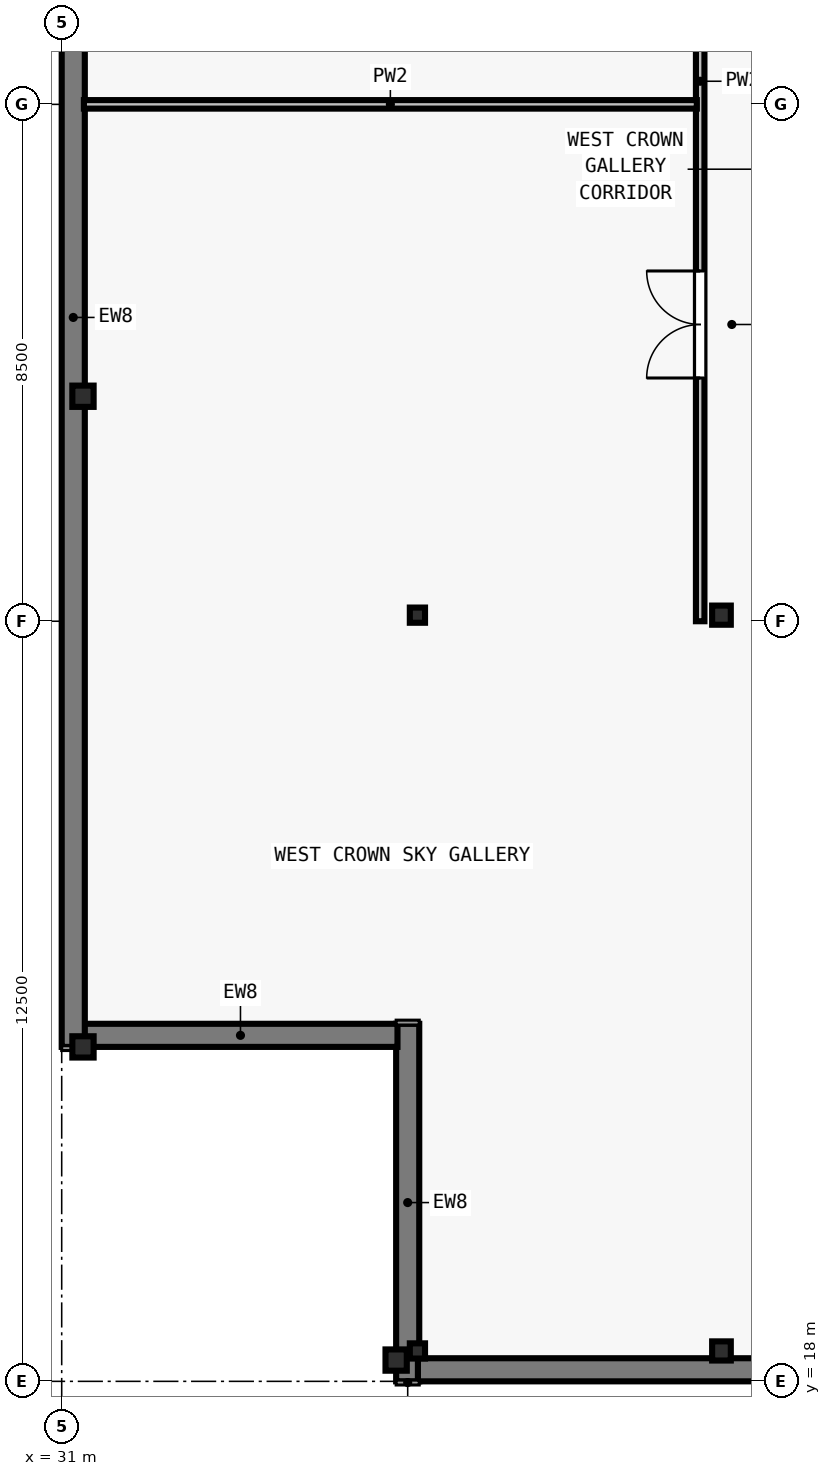
"""IFC4 building model, lengths in metres.
Left out: names, types, materials, properties, quantities, classifications, styles, units other than length and angle.
Written with IfcOpenShell. Run it as: python <this file> out.ifc"""

import sys

from ifc_helpers import new_model, si_unit, direction, frame, frame_2d, origin, origin_2d, place, context, subcontext, project, spatial, rectangle, i_section, extrude, element, fill, save


model = new_model("IFC4")
c1 = context("Model", 3, precision=1e-05, world=origin(), true_north=direction((0.0, 1.0)))
c2 = subcontext(c1, "Body", "Model", "MODEL_VIEW")
j1 = project(units=[si_unit("LENGTHUNIT", "METRE"), si_unit("PLANEANGLEUNIT", "RADIAN")], contexts=[c1])
p1 = place(None, origin())
s1 = spatial("IfcSite", under=j1, at=p1, CompositionType="ELEMENT")
p2 = place(p1, origin())
s2 = spatial("IfcBuilding", under=s1, at=p2, CompositionType="ELEMENT")
p3 = place(p2, frame((0.0, 0.0, 324.5)))
s3 = spatial("IfcBuildingStorey", under=s2, at=p3, CompositionType="ELEMENT", Elevation=324.5)
for number, where, z_axis, x_axis in (
    (1, (36.5, 18.35, 0.0), (0.0, 0.0, 1.0), (1.0, 0.0, 0.0)),
    (2, (31.35, 34.2, 0.0), (0.0, 0.0, 1.0), (1.0, 0.0, 0.0)),
    (3, (31.35, 23.5, 0.0), (0.0, 0.0, 1.0), (1.0, 0.0, 0.0)),
):
    element("IfcColumn", number, at=place(p3, frame(where, z_axis=z_axis, x_axis=x_axis)), inside=s3, PredefinedType="COLUMN", context=c2, shape_type="SweptSolid", body=[
        extrude(i_section(OverallWidth=0.35, OverallDepth=0.35, WebThickness=0.02, FlangeThickness=0.028, at=origin_2d()), origin(), (0.0, 0.0, 1.0), 5.5),
    ])
p4 = place(p3, frame((41.85, 18.5, 0.0), z_axis=(0.0, 0.0, 1.0), x_axis=(1.0, 0.0, 0.0)))
e4 = element("IfcColumn", 4, at=p4, inside=s3, PredefinedType="COLUMN", context=c2, shape_type="SweptSolid", body=[
    extrude(i_section(OverallWidth=0.307, OverallDepth=0.315, WebThickness=0.012, FlangeThickness=0.019, FilletRadius=0.016, at=origin_2d()), origin(), (0.0, 0.0, 1.0), 5.5),
])
p5 = place(p3, frame((36.85, 18.5, 0.0), z_axis=(0.0, 0.0, 1.0), x_axis=(1.0, 0.0, 0.0)))
e5 = element("IfcColumn", 5, at=p5, inside=s3, PredefinedType="PILASTER", context=c2, shape_type="SweptSolid", body=[
    extrude(i_section(OverallWidth=0.203, OverallDepth=0.203, WebThickness=0.009, FlangeThickness=0.014, FilletRadius=0.01, at=origin_2d()), origin(), (0.0, 0.0, 1.0), 5.5),
])
p6 = place(p3, frame((41.85, 30.6, 0.0), z_axis=(0.0, 0.0, 1.0), x_axis=(1.0, 0.0, 0.0)))
e6 = element("IfcColumn", 6, at=p6, inside=s3, PredefinedType="COLUMN", context=c2, shape_type="SweptSolid", body=[
    extrude(i_section(OverallWidth=0.307, OverallDepth=0.315, WebThickness=0.012, FlangeThickness=0.019, FilletRadius=0.016, at=origin_2d()), origin(), (0.0, 0.0, 1.0), 5.5),
])
p7 = place(p3, frame((36.85, 30.6, 0.0), z_axis=(0.0, 0.0, 1.0), x_axis=(1.0, 0.0, 0.0)))
e7 = element("IfcColumn", 7, at=p7, inside=s3, PredefinedType="PILASTER", context=c2, shape_type="SweptSolid", body=[
    extrude(i_section(OverallWidth=0.203, OverallDepth=0.203, WebThickness=0.009, FlangeThickness=0.014, FilletRadius=0.01, at=origin_2d()), origin(), (0.0, 0.0, 1.0), 5.5),
])
p8 = place(p3, frame((36.69, 18.0, 0.0), z_axis=(0.0, 0.0, 1.0), x_axis=(0.0, 1.0, 0.0)))
e8 = element("IfcWall", 8, at=p8, inside=s3, PredefinedType="SOLIDWALL", context=c2, shape_type="SweptSolid", body=[
    extrude(rectangle(XDim=5.88, YDim=0.38, at=frame_2d((2.94, 0.0))), origin(), (0.0, 0.0, 1.0), 5.25),
])
p9 = place(p3, frame((36.522, 23.69, 0.0), z_axis=(0.0, 0.0, 1.0), x_axis=(-1.0, 0.0, 0.0)))
e9 = element("IfcWall", 9, at=p9, inside=s3, PredefinedType="SOLIDWALL", context=c2, shape_type="SweptSolid", body=[
    extrude(rectangle(XDim=5.164, YDim=0.38, at=frame_2d((2.582, 0.0))), origin(), (0.0, 0.0, 1.0), 5.25),
])
p10 = place(p3, frame((31.19, 23.5, 0.0), z_axis=(0.0, 0.0, 1.0), x_axis=(0.0, 1.0, 0.0)))
e10 = element("IfcWall", 10, at=p10, inside=s3, PredefinedType="SOLIDWALL", context=c2, shape_type="SweptSolid", body=[
    extrude(rectangle(XDim=30.642, YDim=0.38, at=frame_2d((15.321, 0.0))), origin(), (0.0, 0.0, 1.0), 5.25),
])
p11 = place(p10, frame((24.142, 0.0, 0.8)))
e11 = element("IfcOpeningElement", 11, at=p11, cuts=e10, PredefinedType="OPENING", context=c2, shape_type="SweptSolid", body=[
    extrude(rectangle(XDim=1.3, YDim=2.05, at=frame_2d((0.65, 1.025))), frame((0.0, 0.2, 0.0), z_axis=(0.0, -1.0, 0.0), x_axis=(1.0, 0.0, 0.0)), (0.0, 0.0, 1.0), 0.4),
])
p12 = place(p3, frame((42.55, 18.19, 0.0), z_axis=(0.0, 0.0, 1.0), x_axis=(-1.0, 0.0, 0.0)))
e12 = element("IfcWall", 12, at=p12, inside=s3, PredefinedType="SOLIDWALL", context=c2, shape_type="SweptSolid", body=[
    extrude(rectangle(XDim=5.692, YDim=0.38, at=frame_2d((2.846, 0.0))), origin(), (0.0, 0.0, 1.0), 5.25),
])
p13 = place(p3, frame((41.5, 30.5, 0.0), z_axis=(0.0, 0.0, 1.0), x_axis=(0.0, 1.0, 0.0)))
e13 = element("IfcWall", 13, at=p13, inside=s3, PredefinedType="PARTITIONING", context=c2, shape_type="SweptSolid", body=[
    extrude(rectangle(XDim=17.0, YDim=0.14, at=frame_2d((8.5, 0.0))), origin(), (0.0, 0.0, 1.0), 5.25),
])
p14 = place(p13, frame((4.0, 0.0, 0.0)))
e14 = element("IfcOpeningElement", 14, at=p14, cuts=e13, PredefinedType="OPENING", context=c2, shape_type="SweptSolid", body=[
    extrude(rectangle(XDim=1.76, YDim=2.2, at=frame_2d((0.88, 1.1))), frame((0.0, 0.08, 0.0), z_axis=(0.0, -1.0, 0.0), x_axis=(1.0, 0.0, 0.0)), (0.0, 0.0, 1.0), 0.16),
])
p15 = place(p13, frame((12.0, 0.0, 0.0)))
e15 = element("IfcOpeningElement", 15, at=p15, cuts=e13, PredefinedType="OPENING", context=c2, shape_type="SweptSolid", body=[
    extrude(rectangle(XDim=1.76, YDim=2.2, at=frame_2d((0.88, 1.1))), frame((0.0, 0.08, 0.0), z_axis=(0.0, -1.0, 0.0), x_axis=(1.0, 0.0, 0.0)), (0.0, 0.0, 1.0), 0.16),
])
p16 = place(p3, frame((31.365, 39.0, 0.0), z_axis=(0.0, 0.0, 1.0), x_axis=(1.0, 0.0, 0.0)))
e16 = element("IfcWall", 16, at=p16, inside=s3, PredefinedType="PARTITIONING", context=c2, shape_type="SweptSolid", body=[
    extrude(rectangle(XDim=10.08, YDim=0.14, at=frame_2d((5.04, 0.0))), origin(), (0.0, 0.0, 1.0), 5.25),
])
p17 = place(p14, origin())
e17 = element("IfcDoor", 17, at=p17, inside=s3, OperationType="DOUBLE_DOOR_SINGLE_SWING", PredefinedType="DOOR", context=c2, shape_type="SweptSolid", body=[
    extrude(rectangle(XDim=1.76, YDim=2.2, at=frame_2d((0.88, 1.1))), frame((0.0, 0.025, 0.0), z_axis=(0.0, -1.0, 0.0), x_axis=(1.0, 0.0, 0.0)), (0.0, 0.0, 1.0), 0.05),
])
fill(e14, e17)
save(model, sys.argv[1])
